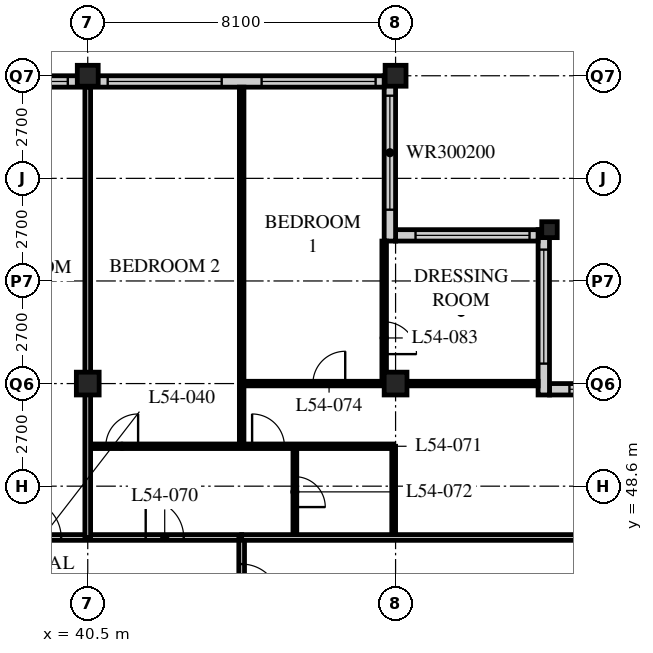
"""IFC4 building model, lengths in metres.
Left out: names, types, materials, properties, quantities, classifications, styles, units other than length and angle.
Written with IfcOpenShell. Run it as: python <this file> out.ifc"""

import sys

from ifc_helpers import new_model, si_unit, direction, frame, frame_2d, origin, origin_2d, place, context, subcontext, project, spatial, rectangle, hollow_rectangle, i_section, extrude, element, fill, save


model = new_model("IFC4")
c1 = context("Model", 3, precision=1e-05, world=origin(), true_north=direction((0.0, 1.0)))
c2 = subcontext(c1, "Body", "Model", "MODEL_VIEW")
j1 = project(units=[si_unit("LENGTHUNIT", "METRE"), si_unit("PLANEANGLEUNIT", "RADIAN")], contexts=[c1])
p1 = place(None, origin())
s1 = spatial("IfcSite", under=j1, at=p1, CompositionType="ELEMENT")
p2 = place(p1, origin())
s2 = spatial("IfcBuilding", under=s1, at=p2, CompositionType="ELEMENT")
p3 = place(p2, frame((0.0, 0.0, 210.0)))
s3 = spatial("IfcBuildingStorey", under=s2, at=p3, CompositionType="ELEMENT", Elevation=210.0)
p4 = place(p3, frame((40.5, 51.3, 0.0), z_axis=(0.0, 0.0, 1.0), x_axis=(1.0, 0.0, 0.0)))
e1 = element("IfcColumn", 1, at=p4, inside=s3, PredefinedType="COLUMN", context=c2, shape_type="SweptSolid", body=[
    extrude(hollow_rectangle(XDim=0.6, YDim=0.6, WallThickness=0.05, at=origin_2d()), origin(), (0.0, 0.0, 1.0), 3.6),
])
p5 = place(p3, frame((40.5, 59.4, 0.0), z_axis=(0.0, 0.0, 1.0), x_axis=(1.0, 0.0, 0.0)))
e2 = element("IfcColumn", 2, at=p5, inside=s3, PredefinedType="COLUMN", context=c2, shape_type="SweptSolid", body=[
    extrude(hollow_rectangle(XDim=0.55, YDim=0.55, WallThickness=0.045, at=origin_2d()), origin(), (0.0, 0.0, 1.0), 3.6),
])
p6 = place(p3, frame((48.6, 51.3, 0.0), z_axis=(0.0, 0.0, 1.0), x_axis=(1.0, 0.0, 0.0)))
e3 = element("IfcColumn", 3, at=p6, inside=s3, PredefinedType="COLUMN", context=c2, shape_type="SweptSolid", body=[
    extrude(hollow_rectangle(XDim=0.6, YDim=0.6, WallThickness=0.05, at=origin_2d()), origin(), (0.0, 0.0, 1.0), 3.6),
])
p7 = place(p3, frame((48.6, 59.4, 0.0), z_axis=(0.0, 0.0, 1.0), x_axis=(1.0, 0.0, 0.0)))
e4 = element("IfcColumn", 4, at=p7, inside=s3, PredefinedType="COLUMN", context=c2, shape_type="SweptSolid", body=[
    extrude(hollow_rectangle(XDim=0.55, YDim=0.55, WallThickness=0.045, at=origin_2d()), origin(), (0.0, 0.0, 1.0), 3.6),
])
p8 = place(p3, frame((52.65, 55.35, 0.0), z_axis=(0.0, 0.0, 1.0), x_axis=(1.0, 0.0, 0.0)))
e5 = element("IfcColumn", 5, at=p8, inside=s3, PredefinedType="COLUMN", context=c2, shape_type="SweptSolid", body=[
    extrude(i_section(OverallWidth=0.407, OverallDepth=0.419, WebThickness=0.031, FlangeThickness=0.049, FilletRadius=0.015, at=origin_2d()), origin(), (0.0, 0.0, 1.0), 3.6),
])
p9 = place(p3, frame((56.4, 51.15, 0.0), z_axis=(0.0, 0.0, 1.0), x_axis=(-1.0, 0.0, 0.0)))
e6 = element("IfcWall", 6, at=p9, inside=s3, PredefinedType="SOLIDWALL", context=c2, shape_type="SweptSolid", body=[
    extrude(rectangle(XDim=3.75, YDim=0.3, at=frame_2d((1.875, 0.0))), origin(), (0.0, 0.0, 1.0), 3.39),
])
p10 = place(p9, frame((0.225, 0.0, 0.6)))
e7 = element("IfcOpeningElement", 7, at=p10, cuts=e6, PredefinedType="OPENING", context=c2, shape_type="SweptSolid", body=[
    extrude(rectangle(XDim=3.0, YDim=2.0, at=frame_2d((1.5, 1.0))), frame((0.0, 0.16, 0.0), z_axis=(0.0, -1.0, 0.0), x_axis=(1.0, 0.0, 0.0)), (0.0, 0.0, 1.0), 0.32),
])
p11 = place(p3, frame((52.5, 51.0, 0.0), z_axis=(0.0, 0.0, 1.0), x_axis=(0.0, 1.0, 0.0)))
e8 = element("IfcWall", 8, at=p11, inside=s3, PredefinedType="SOLIDWALL", context=c2, shape_type="SweptSolid", body=[
    extrude(rectangle(XDim=4.35, YDim=0.3, at=frame_2d((2.175, 0.0))), origin(), (0.0, 0.0, 1.0), 3.39),
])
p12 = place(p11, frame((0.825, 0.0, 0.6)))
e9 = element("IfcOpeningElement", 9, at=p12, cuts=e8, PredefinedType="OPENING", context=c2, shape_type="SweptSolid", body=[
    extrude(rectangle(XDim=3.0, YDim=2.0, at=frame_2d((1.5, 1.0))), frame((0.0, 0.16, 0.0), z_axis=(0.0, -1.0, 0.0), x_axis=(1.0, 0.0, 0.0)), (0.0, 0.0, 1.0), 0.32),
])
p13 = place(p3, frame((52.35, 55.2, 0.0), z_axis=(0.0, 0.0, 1.0), x_axis=(-1.0, 0.0, 0.0)))
e10 = element("IfcWall", 10, at=p13, inside=s3, PredefinedType="SOLIDWALL", context=c2, shape_type="SweptSolid", body=[
    extrude(rectangle(XDim=3.75, YDim=0.3, at=frame_2d((1.875, 0.0))), origin(), (0.0, 0.0, 1.0), 3.39),
])
p14 = place(p13, frame((0.225, 0.0, 0.6)))
e11 = element("IfcOpeningElement", 11, at=p14, cuts=e10, PredefinedType="OPENING", context=c2, shape_type="SweptSolid", body=[
    extrude(rectangle(XDim=3.0, YDim=2.0, at=frame_2d((1.5, 1.0))), frame((0.0, 0.16, 0.0), z_axis=(0.0, -1.0, 0.0), x_axis=(1.0, 0.0, 0.0)), (0.0, 0.0, 1.0), 0.32),
])
p15 = place(p3, frame((48.45, 55.05, 0.0), z_axis=(0.0, 0.0, 1.0), x_axis=(0.0, 1.0, 0.0)))
e12 = element("IfcWall", 12, at=p15, inside=s3, PredefinedType="SOLIDWALL", context=c2, shape_type="SweptSolid", body=[
    extrude(rectangle(XDim=4.35, YDim=0.3, at=frame_2d((2.175, 0.0))), origin(), (0.0, 0.0, 1.0), 3.39),
])
p16 = place(p15, frame((0.825, 0.0, 0.6)))
e13 = element("IfcOpeningElement", 13, at=p16, cuts=e12, PredefinedType="OPENING", context=c2, shape_type="SweptSolid", body=[
    extrude(rectangle(XDim=3.0, YDim=2.0, at=frame_2d((1.5, 1.0))), frame((0.0, 0.16, 0.0), z_axis=(0.0, -1.0, 0.0), x_axis=(1.0, 0.0, 0.0)), (0.0, 0.0, 1.0), 0.32),
])
p17 = place(p3, frame((48.3, 59.25, 0.0), z_axis=(0.0, 0.0, 1.0), x_axis=(-1.0, 0.0, 0.0)))
e14 = element("IfcWall", 14, at=p17, inside=s3, PredefinedType="SOLIDWALL", context=c2, shape_type="SweptSolid", body=[
    extrude(rectangle(XDim=40.2, YDim=0.3, at=frame_2d((20.1, 0.0))), origin(), (0.0, 0.0, 1.0), 3.39),
])
p18 = place(p17, frame((0.225, 0.0, 0.6)))
e15 = element("IfcOpeningElement", 15, at=p18, cuts=e14, PredefinedType="OPENING", context=c2, shape_type="SweptSolid", body=[
    extrude(rectangle(XDim=3.0, YDim=2.4, at=frame_2d((1.5, 1.2))), frame((0.0, 0.16, 0.0), z_axis=(0.0, -1.0, 0.0), x_axis=(1.0, 0.0, 0.0)), (0.0, 0.0, 1.0), 0.32),
])
p19 = place(p17, frame((4.275, 0.0, 0.6)))
e16 = element("IfcOpeningElement", 16, at=p19, cuts=e14, PredefinedType="OPENING", context=c2, shape_type="SweptSolid", body=[
    extrude(rectangle(XDim=3.0, YDim=2.4, at=frame_2d((1.5, 1.2))), frame((0.0, 0.16, 0.0), z_axis=(0.0, -1.0, 0.0), x_axis=(1.0, 0.0, 0.0)), (0.0, 0.0, 1.0), 0.32),
])
p20 = place(p17, frame((8.325, 0.0, 0.6)))
e17 = element("IfcOpeningElement", 17, at=p20, cuts=e14, PredefinedType="OPENING", context=c2, shape_type="SweptSolid", body=[
    extrude(rectangle(XDim=3.0, YDim=2.4, at=frame_2d((1.5, 1.2))), frame((0.0, 0.16, 0.0), z_axis=(0.0, -1.0, 0.0), x_axis=(1.0, 0.0, 0.0)), (0.0, 0.0, 1.0), 0.32),
])
p21 = place(p17, frame((12.375, 0.0, 0.6)))
e18 = element("IfcOpeningElement", 18, at=p21, cuts=e14, PredefinedType="OPENING", context=c2, shape_type="SweptSolid", body=[
    extrude(rectangle(XDim=3.0, YDim=2.4, at=frame_2d((1.5, 1.2))), frame((0.0, 0.16, 0.0), z_axis=(0.0, -1.0, 0.0), x_axis=(1.0, 0.0, 0.0)), (0.0, 0.0, 1.0), 0.32),
])
p22 = place(p17, frame((16.425, 0.0, 0.6)))
e19 = element("IfcOpeningElement", 19, at=p22, cuts=e14, PredefinedType="OPENING", context=c2, shape_type="SweptSolid", body=[
    extrude(rectangle(XDim=3.0, YDim=2.4, at=frame_2d((1.5, 1.2))), frame((0.0, 0.16, 0.0), z_axis=(0.0, -1.0, 0.0), x_axis=(1.0, 0.0, 0.0)), (0.0, 0.0, 1.0), 0.32),
])
p23 = place(p17, frame((20.475, 0.0, 0.6)))
e20 = element("IfcOpeningElement", 20, at=p23, cuts=e14, PredefinedType="OPENING", context=c2, shape_type="SweptSolid", body=[
    extrude(rectangle(XDim=3.0, YDim=2.4, at=frame_2d((1.5, 1.2))), frame((0.0, 0.16, 0.0), z_axis=(0.0, -1.0, 0.0), x_axis=(1.0, 0.0, 0.0)), (0.0, 0.0, 1.0), 0.32),
])
p24 = place(p17, frame((24.525, 0.0, 0.6)))
e21 = element("IfcOpeningElement", 21, at=p24, cuts=e14, PredefinedType="OPENING", context=c2, shape_type="SweptSolid", body=[
    extrude(rectangle(XDim=3.0, YDim=2.4, at=frame_2d((1.5, 1.2))), frame((0.0, 0.16, 0.0), z_axis=(0.0, -1.0, 0.0), x_axis=(1.0, 0.0, 0.0)), (0.0, 0.0, 1.0), 0.32),
])
p25 = place(p17, frame((28.575, 0.0, 0.6)))
e22 = element("IfcOpeningElement", 22, at=p25, cuts=e14, PredefinedType="OPENING", context=c2, shape_type="SweptSolid", body=[
    extrude(rectangle(XDim=3.0, YDim=2.4, at=frame_2d((1.5, 1.2))), frame((0.0, 0.16, 0.0), z_axis=(0.0, -1.0, 0.0), x_axis=(1.0, 0.0, 0.0)), (0.0, 0.0, 1.0), 0.32),
])
p26 = place(p17, frame((32.625, 0.0, 0.6)))
e23 = element("IfcOpeningElement", 23, at=p26, cuts=e14, PredefinedType="OPENING", context=c2, shape_type="SweptSolid", body=[
    extrude(rectangle(XDim=3.0, YDim=2.4, at=frame_2d((1.5, 1.2))), frame((0.0, 0.16, 0.0), z_axis=(0.0, -1.0, 0.0), x_axis=(1.0, 0.0, 0.0)), (0.0, 0.0, 1.0), 0.32),
])
p27 = place(p17, frame((36.675, 0.0, 0.6)))
e24 = element("IfcOpeningElement", 24, at=p27, cuts=e14, PredefinedType="OPENING", context=c2, shape_type="SweptSolid", body=[
    extrude(rectangle(XDim=3.0, YDim=2.4, at=frame_2d((1.5, 1.2))), frame((0.0, 0.16, 0.0), z_axis=(0.0, -1.0, 0.0), x_axis=(1.0, 0.0, 0.0)), (0.0, 0.0, 1.0), 0.32),
])
p28 = place(p3, frame((8.1, 47.25, 0.0), z_axis=(0.0, 0.0, 1.0), x_axis=(1.0, 0.0, 0.0)))
e25 = element("IfcWall", 25, at=p28, inside=s3, PredefinedType="PARTITIONING", context=c2, shape_type="SweptSolid", body=[
    extrude(rectangle(XDim=36.45, YDim=0.15, at=frame_2d((18.225, 0.0))), origin(), (0.0, 0.0, 1.0), 3.39),
])
p29 = place(p28, frame((4.45, 0.0, 0.0)))
e26 = element("IfcOpeningElement", 26, at=p29, cuts=e25, PredefinedType="OPENING", context=c2, shape_type="SweptSolid", body=[
    extrude(rectangle(XDim=1.0, YDim=2.1, at=frame_2d((0.5, 1.05))), frame((0.0, 0.085, 0.0), z_axis=(0.0, -1.0, 0.0), x_axis=(1.0, 0.0, 0.0)), (0.0, 0.0, 1.0), 0.17),
])
p30 = place(p28, frame((12.55, 0.0, 0.0)))
e27 = element("IfcOpeningElement", 27, at=p30, cuts=e25, PredefinedType="OPENING", context=c2, shape_type="SweptSolid", body=[
    extrude(rectangle(XDim=1.0, YDim=2.1, at=frame_2d((0.5, 1.05))), frame((0.0, 0.085, 0.0), z_axis=(0.0, -1.0, 0.0), x_axis=(1.0, 0.0, 0.0)), (0.0, 0.0, 1.0), 0.17),
])
p31 = place(p28, frame((30.7, 0.0, 0.0)))
e28 = element("IfcOpeningElement", 28, at=p31, cuts=e25, PredefinedType="OPENING", context=c2, shape_type="SweptSolid", body=[
    extrude(rectangle(XDim=1.0, YDim=2.1, at=frame_2d((0.5, 1.05))), frame((0.0, 0.085, 0.0), z_axis=(0.0, -1.0, 0.0), x_axis=(1.0, 0.0, 0.0)), (0.0, 0.0, 1.0), 0.17),
])
p32 = place(p28, frame((33.925, 0.0, 0.0)))
e29 = element("IfcOpeningElement", 29, at=p32, cuts=e25, PredefinedType="OPENING", context=c2, shape_type="SweptSolid", body=[
    extrude(rectangle(XDim=1.0, YDim=2.1, at=frame_2d((0.5, 1.05))), frame((0.0, 0.085, 0.0), z_axis=(0.0, -1.0, 0.0), x_axis=(1.0, 0.0, 0.0)), (0.0, 0.0, 1.0), 0.17),
])
p33 = place(p28, frame((1.525, 0.0, 0.0)))
e30 = element("IfcOpeningElement", 30, at=p33, cuts=e25, PredefinedType="OPENING", context=c2, shape_type="SweptSolid", body=[
    extrude(rectangle(XDim=1.0, YDim=2.1, at=frame_2d((0.5, 1.05))), frame((0.0, 0.085, 0.0), z_axis=(0.0, -1.0, 0.0), x_axis=(1.0, 0.0, 0.0)), (0.0, 0.0, 1.0), 0.17),
])
p34 = place(p3, frame((44.55, 18.9, 0.0), z_axis=(0.0, 0.0, 1.0), x_axis=(0.0, 1.0, 0.0)))
e31 = element("IfcWall", 31, at=p34, inside=s3, PredefinedType="PARTITIONING", context=c2, shape_type="SweptSolid", body=[
    extrude(rectangle(XDim=28.35, YDim=0.15, at=frame_2d((14.175, 0.0))), origin(), (0.0, 0.0, 1.0), 3.39),
])
p35 = place(p34, frame((0.4, 0.0, 0.0)))
e32 = element("IfcOpeningElement", 32, at=p35, cuts=e31, PredefinedType="OPENING", context=c2, shape_type="SweptSolid", body=[
    extrude(rectangle(XDim=1.0, YDim=2.1, at=frame_2d((0.5, 1.05))), frame((0.0, 0.085, 0.0), z_axis=(0.0, -1.0, 0.0), x_axis=(1.0, 0.0, 0.0)), (0.0, 0.0, 1.0), 0.17),
])
p36 = place(p34, frame((12.55, 0.0, 0.0)))
e33 = element("IfcOpeningElement", 33, at=p36, cuts=e31, PredefinedType="OPENING", context=c2, shape_type="SweptSolid", body=[
    extrude(rectangle(XDim=1.0, YDim=2.1, at=frame_2d((0.5, 1.05))), frame((0.0, 0.085, 0.0), z_axis=(0.0, -1.0, 0.0), x_axis=(1.0, 0.0, 0.0)), (0.0, 0.0, 1.0), 0.17),
])
p37 = place(p34, frame((26.65, 0.0, 0.0)))
e34 = element("IfcOpeningElement", 34, at=p37, cuts=e31, PredefinedType="OPENING", context=c2, shape_type="SweptSolid", body=[
    extrude(rectangle(XDim=1.0, YDim=2.1, at=frame_2d((0.5, 1.05))), frame((0.0, 0.085, 0.0), z_axis=(0.0, -1.0, 0.0), x_axis=(1.0, 0.0, 0.0)), (0.0, 0.0, 1.0), 0.17),
])
p38 = place(p3, frame((40.5, 49.65, 0.0), z_axis=(0.0, 0.0, 1.0), x_axis=(1.0, 0.0, 0.0)))
e35 = element("IfcWall", 35, at=p38, inside=s3, PredefinedType="PARTITIONING", context=c2, shape_type="SweptSolid", body=[
    extrude(rectangle(XDim=8.05, YDim=0.12, at=frame_2d((4.025, 0.0))), origin(), (0.0, 0.0, 1.0), 3.39),
])
p39 = place(p38, frame((0.475, 0.0, 0.0)))
e36 = element("IfcOpeningElement", 36, at=p39, cuts=e35, PredefinedType="OPENING", context=c2, shape_type="SweptSolid", body=[
    extrude(rectangle(XDim=0.85, YDim=2.1, at=frame_2d((0.425, 1.05))), frame((0.0, 0.07, 0.0), z_axis=(0.0, -1.0, 0.0), x_axis=(1.0, 0.0, 0.0)), (0.0, 0.0, 1.0), 0.14),
])
p40 = place(p38, frame((4.325, 0.0, 0.0)))
e37 = element("IfcOpeningElement", 37, at=p40, cuts=e35, PredefinedType="OPENING", context=c2, shape_type="SweptSolid", body=[
    extrude(rectangle(XDim=0.85, YDim=2.1, at=frame_2d((0.425, 1.05))), frame((0.0, 0.07, 0.0), z_axis=(0.0, -1.0, 0.0), x_axis=(1.0, 0.0, 0.0)), (0.0, 0.0, 1.0), 0.14),
])
p41 = place(p3, frame((45.95, 47.25, 0.0), z_axis=(0.0, 0.0, 1.0), x_axis=(0.0, 1.0, 0.0)))
e38 = element("IfcWall", 38, at=p41, inside=s3, PredefinedType="PARTITIONING", context=c2, shape_type="SweptSolid", body=[
    extrude(rectangle(XDim=2.4, YDim=0.1, at=frame_2d((1.2, 0.0))), origin(), (0.0, 0.0, 1.0), 3.39),
])
p42 = place(p41, frame((0.8, 0.0, 0.0)))
e39 = element("IfcOpeningElement", 39, at=p42, cuts=e38, PredefinedType="OPENING", context=c2, shape_type="SweptSolid", body=[
    extrude(rectangle(XDim=0.8, YDim=2.1, at=frame_2d((0.4, 1.05))), frame((0.0, 0.06, 0.0), z_axis=(0.0, -1.0, 0.0), x_axis=(1.0, 0.0, 0.0)), (0.0, 0.0, 1.0), 0.12),
])
p43 = place(p3, frame((48.55, 47.25, 0.0), z_axis=(0.0, 0.0, 1.0), x_axis=(0.0, 1.0, 0.0)))
e40 = element("IfcWall", 40, at=p43, inside=s3, PredefinedType="PARTITIONING", context=c2, shape_type="SweptSolid", body=[
    extrude(rectangle(XDim=2.4, YDim=0.1, at=frame_2d((1.2, 0.0))), origin(), (0.0, 0.0, 1.0), 2.778),
])
p44 = place(p3, frame((44.55, 49.65, 0.0), z_axis=(0.0, 0.0, 1.0), x_axis=(0.0, 1.0, 0.0)))
e41 = element("IfcWall", 41, at=p44, inside=s3, PredefinedType="PARTITIONING", context=c2, shape_type="SweptSolid", body=[
    extrude(rectangle(XDim=9.45, YDim=0.12, at=frame_2d((4.725, 0.0))), origin(), (0.0, 0.0, 1.0), 3.39),
])
p45 = place(p3, frame((44.55, 51.3, 0.0), z_axis=(0.0, 0.0, 1.0), x_axis=(1.0, 0.0, 0.0)))
e42 = element("IfcWall", 42, at=p45, inside=s3, PredefinedType="PARTITIONING", context=c2, shape_type="SweptSolid", body=[
    extrude(rectangle(XDim=7.8, YDim=0.12, at=frame_2d((3.9, 0.0))), origin(), (0.0, 0.0, 1.0), 2.778),
])
p46 = place(p45, frame((1.875, 0.0, 0.0)))
e43 = element("IfcOpeningElement", 43, at=p46, cuts=e42, PredefinedType="OPENING", context=c2, shape_type="SweptSolid", body=[
    extrude(rectangle(XDim=0.85, YDim=2.1, at=frame_2d((0.425, 1.05))), frame((0.0, 0.07, 0.0), z_axis=(0.0, -1.0, 0.0), x_axis=(1.0, 0.0, 0.0)), (0.0, 0.0, 1.0), 0.14),
])
p47 = place(p3, frame((44.55, 47.25, 0.0), z_axis=(0.0, 0.0, 1.0), x_axis=(1.0, 0.0, 0.0)))
e44 = element("IfcWall", 44, at=p47, inside=s3, PredefinedType="PARTITIONING", context=c2, shape_type="SweptSolid", body=[
    extrude(rectangle(XDim=11.85, YDim=0.15, at=frame_2d((5.925, 0.0))), origin(), (0.0, 0.0, 1.0), 3.39),
])
p48 = place(p3, frame((40.5, 47.25, 0.0), z_axis=(0.0, 0.0, 1.0), x_axis=(0.0, 1.0, 0.0)))
e45 = element("IfcWall", 45, at=p48, inside=s3, PredefinedType="PARTITIONING", context=c2, shape_type="SweptSolid", body=[
    extrude(rectangle(XDim=11.85, YDim=0.15, at=frame_2d((5.925, 0.0))), origin(), (0.0, 0.0, 1.0), 2.778),
])
p49 = place(p3, frame((48.3, 51.3, 0.0), z_axis=(0.0, 0.0, 1.0), x_axis=(0.0, 1.0, 0.0)))
e46 = element("IfcWall", 46, at=p49, inside=s3, PredefinedType="PARTITIONING", context=c2, shape_type="SweptSolid", body=[
    extrude(rectangle(XDim=3.75, YDim=0.12, at=frame_2d((1.875, 0.0))), origin(), (0.0, 0.0, 1.0), 3.39),
])
p50 = place(p49, frame((0.775, 0.0, 0.0)))
e47 = element("IfcOpeningElement", 47, at=p50, cuts=e46, PredefinedType="OPENING", context=c2, shape_type="SweptSolid", body=[
    extrude(rectangle(XDim=0.85, YDim=2.1, at=frame_2d((0.425, 1.05))), frame((0.0, 0.07, 0.0), z_axis=(0.0, -1.0, 0.0), x_axis=(1.0, 0.0, 0.0)), (0.0, 0.0, 1.0), 0.14),
])
p51 = place(p10, origin())
e48 = element("IfcWindow", 48, at=p51, inside=s3, PartitioningType="SINGLE_PANEL", PredefinedType="WINDOW", context=c2, shape_type="SweptSolid", body=[
    extrude(rectangle(XDim=3.0, YDim=2.0, at=frame_2d((1.5, 1.0))), frame((0.0, 0.03, 0.0), z_axis=(0.0, -1.0, 0.0), x_axis=(1.0, 0.0, 0.0)), (0.0, 0.0, 1.0), 0.06),
])
fill(e7, e48)
p52 = place(p12, origin())
e49 = element("IfcWindow", 49, at=p52, inside=s3, PartitioningType="SINGLE_PANEL", PredefinedType="WINDOW", context=c2, shape_type="SweptSolid", body=[
    extrude(rectangle(XDim=3.0, YDim=2.0, at=frame_2d((1.5, 1.0))), frame((0.0, 0.03, 0.0), z_axis=(0.0, -1.0, 0.0), x_axis=(1.0, 0.0, 0.0)), (0.0, 0.0, 1.0), 0.06),
])
fill(e9, e49)
p53 = place(p14, origin())
e50 = element("IfcWindow", 50, at=p53, inside=s3, PartitioningType="SINGLE_PANEL", PredefinedType="WINDOW", context=c2, shape_type="SweptSolid", body=[
    extrude(rectangle(XDim=3.0, YDim=2.0, at=frame_2d((1.5, 1.0))), frame((0.0, 0.03, 0.0), z_axis=(0.0, -1.0, 0.0), x_axis=(1.0, 0.0, 0.0)), (0.0, 0.0, 1.0), 0.06),
])
fill(e11, e50)
p54 = place(p16, origin())
e51 = element("IfcWindow", 51, at=p54, inside=s3, PartitioningType="SINGLE_PANEL", PredefinedType="WINDOW", context=c2, shape_type="SweptSolid", body=[
    extrude(rectangle(XDim=3.0, YDim=2.0, at=frame_2d((1.5, 1.0))), frame((0.0, 0.03, 0.0), z_axis=(0.0, -1.0, 0.0), x_axis=(1.0, 0.0, 0.0)), (0.0, 0.0, 1.0), 0.06),
])
fill(e13, e51)
p55 = place(p18, origin())
e52 = element("IfcWindow", 52, at=p55, inside=s3, PartitioningType="SINGLE_PANEL", PredefinedType="WINDOW", context=c2, shape_type="SweptSolid", body=[
    extrude(rectangle(XDim=3.0, YDim=2.4, at=frame_2d((1.5, 1.2))), frame((0.0, 0.03, 0.0), z_axis=(0.0, -1.0, 0.0), x_axis=(1.0, 0.0, 0.0)), (0.0, 0.0, 1.0), 0.06),
])
fill(e15, e52)
p56 = place(p19, origin())
e53 = element("IfcWindow", 53, at=p56, inside=s3, PartitioningType="SINGLE_PANEL", PredefinedType="WINDOW", context=c2, shape_type="SweptSolid", body=[
    extrude(rectangle(XDim=3.0, YDim=2.4, at=frame_2d((1.5, 1.2))), frame((0.0, 0.03, 0.0), z_axis=(0.0, -1.0, 0.0), x_axis=(1.0, 0.0, 0.0)), (0.0, 0.0, 1.0), 0.06),
])
fill(e16, e53)
p57 = place(p20, origin())
e54 = element("IfcWindow", 54, at=p57, inside=s3, PartitioningType="SINGLE_PANEL", PredefinedType="WINDOW", context=c2, shape_type="SweptSolid", body=[
    extrude(rectangle(XDim=3.0, YDim=2.4, at=frame_2d((1.5, 1.2))), frame((0.0, 0.03, 0.0), z_axis=(0.0, -1.0, 0.0), x_axis=(1.0, 0.0, 0.0)), (0.0, 0.0, 1.0), 0.06),
])
fill(e17, e54)
p58 = place(p31, origin())
e55 = element("IfcDoor", 55, at=p58, inside=s3, OperationType="SINGLE_SWING_LEFT", PredefinedType="DOOR", context=c2, shape_type="SweptSolid", body=[
    extrude(rectangle(XDim=1.0, YDim=2.1, at=frame_2d((0.5, 1.05))), frame((0.0, 0.025, 0.0), z_axis=(0.0, -1.0, 0.0), x_axis=(1.0, 0.0, 0.0)), (0.0, 0.0, 1.0), 0.05),
])
fill(e28, e55)
p59 = place(p37, origin())
e56 = element("IfcDoor", 56, at=p59, inside=s3, OperationType="SINGLE_SWING_RIGHT", PredefinedType="DOOR", context=c2, shape_type="SweptSolid", body=[
    extrude(rectangle(XDim=1.0, YDim=2.1, at=frame_2d((0.5, 1.05))), frame((0.0, 0.025, 0.0), z_axis=(0.0, -1.0, 0.0), x_axis=(1.0, 0.0, 0.0)), (0.0, 0.0, 1.0), 0.05),
])
fill(e34, e56)
p60 = place(p32, origin())
e57 = element("IfcDoor", 57, at=p60, inside=s3, OperationType="SINGLE_SWING_LEFT", PredefinedType="DOOR", context=c2, shape_type="SweptSolid", body=[
    extrude(rectangle(XDim=1.0, YDim=2.1, at=frame_2d((0.5, 1.05))), frame((0.0, 0.025, 0.0), z_axis=(0.0, -1.0, 0.0), x_axis=(1.0, 0.0, 0.0)), (0.0, 0.0, 1.0), 0.05),
])
fill(e29, e57)
p61 = place(p39, origin())
e58 = element("IfcDoor", 58, at=p61, inside=s3, OperationType="SINGLE_SWING_RIGHT", PredefinedType="DOOR", context=c2, shape_type="SweptSolid", body=[
    extrude(rectangle(XDim=0.85, YDim=2.1, at=frame_2d((0.425, 1.05))), frame((0.0, 0.025, 0.0), z_axis=(0.0, -1.0, 0.0), x_axis=(1.0, 0.0, 0.0)), (0.0, 0.0, 1.0), 0.05),
])
fill(e36, e58)
p62 = place(p42, origin())
e59 = element("IfcDoor", 59, at=p62, inside=s3, OperationType="SINGLE_SWING_RIGHT", PredefinedType="DOOR", context=c2, shape_type="SweptSolid", body=[
    extrude(rectangle(XDim=0.8, YDim=2.1, at=frame_2d((0.4, 1.05))), frame((0.0, 0.025, 0.0), z_axis=(0.0, -1.0, 0.0), x_axis=(1.0, 0.0, 0.0)), (0.0, 0.0, 1.0), 0.05),
])
fill(e39, e59)
p63 = place(p40, origin())
e60 = element("IfcDoor", 60, at=p63, inside=s3, OperationType="SINGLE_SWING_LEFT", PredefinedType="DOOR", context=c2, shape_type="SweptSolid", body=[
    extrude(rectangle(XDim=0.85, YDim=2.1, at=frame_2d((0.425, 1.05))), frame((0.0, 0.025, 0.0), z_axis=(0.0, -1.0, 0.0), x_axis=(1.0, 0.0, 0.0)), (0.0, 0.0, 1.0), 0.05),
])
fill(e37, e60)
p64 = place(p46, origin())
e61 = element("IfcDoor", 61, at=p64, inside=s3, OperationType="SINGLE_SWING_RIGHT", PredefinedType="DOOR", context=c2, shape_type="SweptSolid", body=[
    extrude(rectangle(XDim=0.85, YDim=2.1, at=frame_2d((0.425, 1.05))), frame((0.0, 0.025, 0.0), z_axis=(0.0, -1.0, 0.0), x_axis=(1.0, 0.0, 0.0)), (0.0, 0.0, 1.0), 0.05),
])
fill(e43, e61)
p65 = place(p50, origin())
e62 = element("IfcDoor", 62, at=p65, inside=s3, OperationType="SINGLE_SWING_RIGHT", PredefinedType="DOOR", context=c2, shape_type="SweptSolid", body=[
    extrude(rectangle(XDim=0.85, YDim=2.1, at=frame_2d((0.425, 1.05))), frame((0.0, 0.025, 0.0), z_axis=(0.0, -1.0, 0.0), x_axis=(1.0, 0.0, 0.0)), (0.0, 0.0, 1.0), 0.05),
])
fill(e47, e62)
save(model, sys.argv[1])
